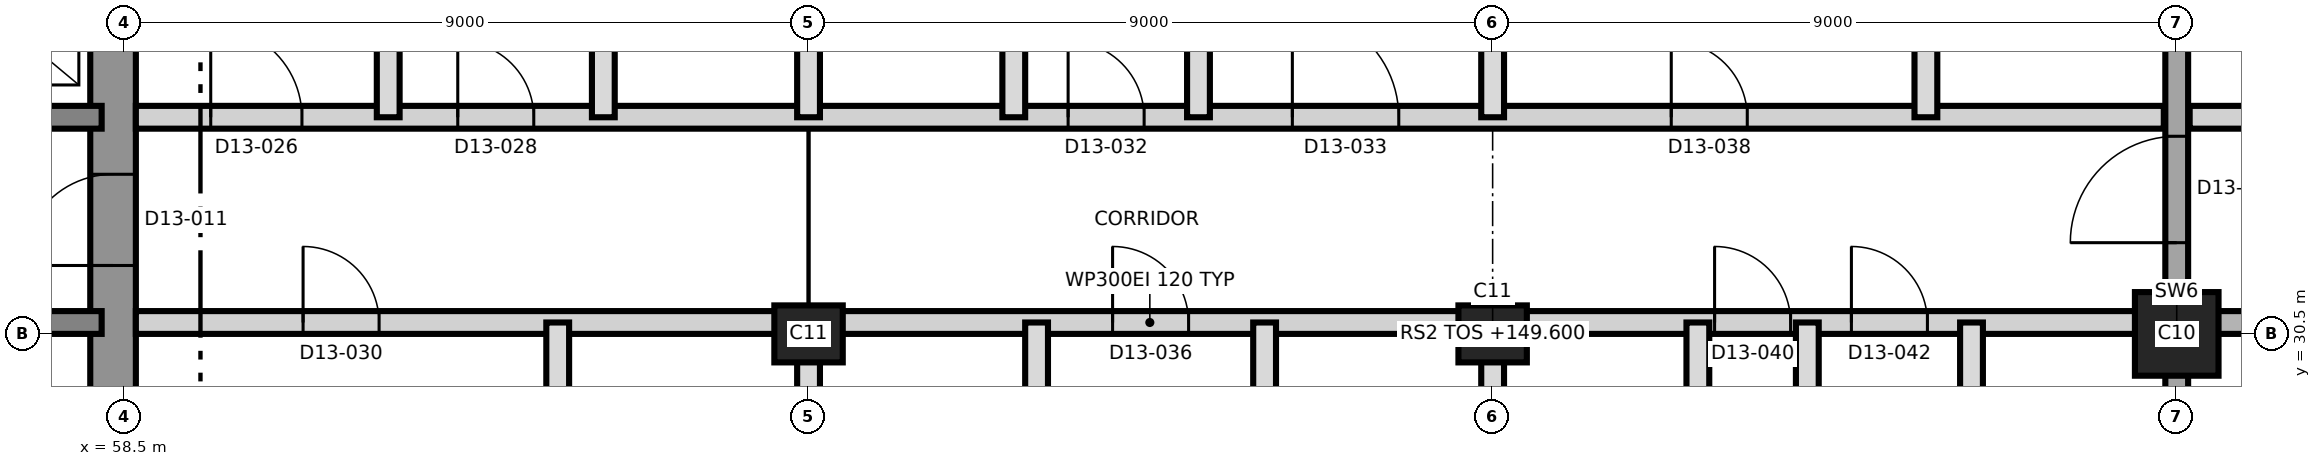
"""IFC4 building model, lengths in metres.
Left out: names, types, materials, properties, quantities, classifications, styles, units other than length and angle.
Written with IfcOpenShell. Run it as: python <this file> out.ifc"""

import sys

from ifc_helpers import new_model, si_unit, direction, frame, frame_2d, origin, origin_2d, place, context, subcontext, project, spatial, rectangle, extrude, element, fill, save


model = new_model("IFC4")
c1 = context("Model", 3, precision=1e-05, world=origin(), true_north=direction((0.0, 1.0)))
c2 = subcontext(c1, "Body", "Model", "MODEL_VIEW")
j1 = project(units=[si_unit("LENGTHUNIT", "METRE"), si_unit("PLANEANGLEUNIT", "RADIAN")], contexts=[c1])
p1 = place(None, origin())
s1 = spatial("IfcSite", under=j1, at=p1, CompositionType="ELEMENT")
p2 = place(p1, origin())
s2 = spatial("IfcBuilding", under=s1, at=p2, CompositionType="ELEMENT")
p3 = place(p2, frame((0.0, 0.0, 145.9)))
s3 = spatial("IfcBuildingStorey", under=s2, at=p3, CompositionType="ELEMENT", Elevation=145.9)
p4 = place(p3, frame((58.35, 21.2, 0.0), z_axis=(0.0, 0.0, 1.0), x_axis=(0.0, 1.0, 0.0)))
e1 = element("IfcWall", 1, at=p4, inside=s3, PredefinedType="SHEAR", context=c2, shape_type="SweptSolid", body=[
    extrude(rectangle(XDim=18.6, YDim=0.6, at=frame_2d((9.3, 0.0))), origin(), (0.0, 0.0, 1.0), 3.7),
])
p5 = place(p4, frame((10.2, 0.0, 0.0)))
e2 = element("IfcOpeningElement", 2, at=p5, cuts=e1, PredefinedType="OPENING", context=c2, shape_type="SweptSolid", body=[
    extrude(rectangle(XDim=1.2, YDim=2.1, at=frame_2d((0.6, 1.05))), frame((0.0, 0.31, 0.0), z_axis=(0.0, -1.0, 0.0), x_axis=(1.0, 0.0, 0.0)), (0.0, 0.0, 1.0), 0.62),
])
p6 = place(p3, frame((31.8, 30.65, 0.0), z_axis=(0.0, 0.0, 1.0), x_axis=(1.0, 0.0, 0.0)))
e3 = element("IfcWall", 3, at=p6, inside=s3, PredefinedType="SHEAR", context=c2, shape_type="SweptSolid", body=[
    extrude(rectangle(XDim=26.4, YDim=0.3, at=frame_2d((13.2, 0.0))), origin(), (0.0, 0.0, 1.0), 3.7),
])
p7 = place(p6, frame((24.7, 0.0, 0.0)))
e4 = element("IfcOpeningElement", 4, at=p7, cuts=e3, PredefinedType="OPENING", context=c2, shape_type="SweptSolid", body=[
    extrude(rectangle(XDim=1.0, YDim=2.1, at=frame_2d((0.5, 1.05))), frame((0.0, 0.16, 0.0), z_axis=(0.0, -1.0, 0.0), x_axis=(1.0, 0.0, 0.0)), (0.0, 0.0, 1.0), 0.32),
])
p8 = place(p6, frame((4.0, 0.0, 0.0)))
e5 = element("IfcOpeningElement", 5, at=p8, cuts=e3, PredefinedType="OPENING", context=c2, shape_type="SweptSolid", body=[
    extrude(rectangle(XDim=1.0, YDim=2.1, at=frame_2d((0.5, 1.05))), frame((0.0, 0.16, 0.0), z_axis=(0.0, -1.0, 0.0), x_axis=(1.0, 0.0, 0.0)), (0.0, 0.0, 1.0), 0.32),
])
p9 = place(p3, frame((31.8, 33.35, 0.0), z_axis=(0.0, 0.0, 1.0), x_axis=(1.0, 0.0, 0.0)))
e6 = element("IfcWall", 6, at=p9, inside=s3, PredefinedType="SHEAR", context=c2, shape_type="SweptSolid", body=[
    extrude(rectangle(XDim=26.4, YDim=0.3, at=frame_2d((13.2, 0.0))), origin(), (0.0, 0.0, 1.0), 3.7),
])
p10 = place(p9, frame((13.85, 0.0, 0.0)))
e7 = element("IfcOpeningElement", 7, at=p10, cuts=e6, PredefinedType="OPENING", context=c2, shape_type="SweptSolid", body=[
    extrude(rectangle(XDim=1.4, YDim=2.1, at=frame_2d((0.7, 1.05))), frame((0.0, 0.16, 0.0), z_axis=(0.0, -1.0, 0.0), x_axis=(1.0, 0.0, 0.0)), (0.0, 0.0, 1.0), 0.32),
])
p11 = place(p9, frame((5.325, 0.0, 0.0)))
e8 = element("IfcOpeningElement", 8, at=p11, cuts=e6, PredefinedType="OPENING", context=c2, shape_type="SweptSolid", body=[
    extrude(rectangle(XDim=1.2, YDim=2.1, at=frame_2d((0.6, 1.05))), frame((0.0, 0.16, 0.0), z_axis=(0.0, -1.0, 0.0), x_axis=(1.0, 0.0, 0.0)), (0.0, 0.0, 1.0), 0.32),
])
p12 = place(p9, frame((19.875, 0.0, 0.0)))
e9 = element("IfcOpeningElement", 9, at=p12, cuts=e6, PredefinedType="OPENING", context=c2, shape_type="SweptSolid", body=[
    extrude(rectangle(XDim=1.2, YDim=2.1, at=frame_2d((0.6, 1.05))), frame((0.0, 0.16, 0.0), z_axis=(0.0, -1.0, 0.0), x_axis=(1.0, 0.0, 0.0)), (0.0, 0.0, 1.0), 0.32),
])
for number, where, z_axis, x_axis in (
    (10, (67.5, 30.5, 0.0), (0.0, 0.0, 1.0), (1.0, 0.0, 0.0)),
    (11, (76.5, 30.5, 0.0), (0.0, 0.0, 1.0), (1.0, 0.0, 0.0)),
):
    element("IfcColumn", number, at=place(p3, frame(where, z_axis=z_axis, x_axis=x_axis)), inside=s3, PredefinedType="COLUMN", context=c2, shape_type="SweptSolid", body=[
        extrude(rectangle(XDim=0.9, YDim=0.75, at=origin_2d()), origin(), (0.0, 0.0, 1.0), 3.7),
    ])
p13 = place(p3, frame((85.5, 30.5, 0.0), z_axis=(0.0, 0.0, 1.0), x_axis=(1.0, 0.0, 0.0)))
e12 = element("IfcColumn", 12, at=p13, inside=s3, PredefinedType="COLUMN", context=c2, shape_type="SweptSolid", body=[
    extrude(rectangle(XDim=1.1, YDim=1.1, at=origin_2d()), origin(), (0.0, 0.0, 1.0), 3.7),
])
p14 = place(p3, frame((85.5, 20.35, 0.0), z_axis=(0.0, 0.0, 1.0), x_axis=(0.0, 1.0, 0.0)))
e13 = element("IfcWall", 13, at=p14, inside=s3, PredefinedType="SHEAR", context=c2, shape_type="SweptSolid", body=[
    extrude(rectangle(XDim=20.3, YDim=0.3, at=frame_2d((10.15, 0.0))), origin(), (0.0, 0.0, 1.0), 3.7),
])
p15 = place(p14, frame((11.35, 0.0, 0.0)))
e14 = element("IfcOpeningElement", 14, at=p15, cuts=e13, PredefinedType="OPENING", context=c2, shape_type="SweptSolid", body=[
    extrude(rectangle(XDim=1.4, YDim=2.1, at=frame_2d((0.7, 1.05))), frame((0.0, 0.16, 0.0), z_axis=(0.0, -1.0, 0.0), x_axis=(1.0, 0.0, 0.0)), (0.0, 0.0, 1.0), 0.32),
])
p16 = place(p3, frame((58.65, 30.65, 0.0), z_axis=(0.0, 0.0, 1.0), x_axis=(1.0, 0.0, 0.0)))
e15 = element("IfcWall", 15, at=p16, inside=s3, PredefinedType="PARTITIONING", context=c2, shape_type="SweptSolid", body=[
    extrude(rectangle(XDim=26.68, YDim=0.3, at=frame_2d((13.34, 0.0))), origin(), (0.0, 0.0, 1.0), 3.3),
])
p17 = place(p16, frame((2.2, 0.0, 0.0)))
e16 = element("IfcOpeningElement", 16, at=p17, cuts=e15, PredefinedType="OPENING", context=c2, shape_type="SweptSolid", body=[
    extrude(rectangle(XDim=1.0, YDim=2.4, at=frame_2d((0.5, 1.2))), frame((0.0, 0.16, 0.0), z_axis=(0.0, -1.0, 0.0), x_axis=(1.0, 0.0, 0.0)), (0.0, 0.0, 1.0), 0.32),
])
p18 = place(p16, frame((12.85, 0.0, 0.0)))
e17 = element("IfcOpeningElement", 17, at=p18, cuts=e15, PredefinedType="OPENING", context=c2, shape_type="SweptSolid", body=[
    extrude(rectangle(XDim=1.0, YDim=2.4, at=frame_2d((0.5, 1.2))), frame((0.0, 0.16, 0.0), z_axis=(0.0, -1.0, 0.0), x_axis=(1.0, 0.0, 0.0)), (0.0, 0.0, 1.0), 0.32),
])
p19 = place(p16, frame((20.77, 0.0, 0.0)))
e18 = element("IfcOpeningElement", 18, at=p19, cuts=e15, PredefinedType="OPENING", context=c2, shape_type="SweptSolid", body=[
    extrude(rectangle(XDim=1.0, YDim=2.1, at=frame_2d((0.5, 1.05))), frame((0.0, 0.16, 0.0), z_axis=(0.0, -1.0, 0.0), x_axis=(1.0, 0.0, 0.0)), (0.0, 0.0, 1.0), 0.32),
])
p20 = place(p16, frame((22.57, 0.0, 0.0)))
e19 = element("IfcOpeningElement", 19, at=p20, cuts=e15, PredefinedType="OPENING", context=c2, shape_type="SweptSolid", body=[
    extrude(rectangle(XDim=1.0, YDim=2.1, at=frame_2d((0.5, 1.05))), frame((0.0, 0.16, 0.0), z_axis=(0.0, -1.0, 0.0), x_axis=(1.0, 0.0, 0.0)), (0.0, 0.0, 1.0), 0.32),
])
p21 = place(p3, frame((85.67, 30.65, 0.0), z_axis=(0.0, 0.0, 1.0), x_axis=(1.0, 0.0, 0.0)))
e20 = element("IfcWall", 20, at=p21, inside=s3, PredefinedType="SHEAR", context=c2, shape_type="SweptSolid", body=[
    extrude(rectangle(XDim=9.58, YDim=0.3, at=frame_2d((4.79, 0.0))), origin(), (0.0, 0.0, 1.0), 3.4),
])
p22 = place(p21, frame((2.08, 0.0, 0.0)))
e21 = element("IfcOpeningElement", 21, at=p22, cuts=e20, PredefinedType="OPENING", context=c2, shape_type="SweptSolid", body=[
    extrude(rectangle(XDim=1.2, YDim=2.1, at=frame_2d((0.6, 1.05))), frame((0.0, 0.16, 0.0), z_axis=(0.0, -1.0, 0.0), x_axis=(1.0, 0.0, 0.0)), (0.0, 0.0, 1.0), 0.32),
])
p23 = place(p21, frame((5.63, 0.0, 0.0)))
e22 = element("IfcOpeningElement", 22, at=p23, cuts=e20, PredefinedType="OPENING", context=c2, shape_type="SweptSolid", body=[
    extrude(rectangle(XDim=1.0, YDim=2.1, at=frame_2d((0.5, 1.05))), frame((0.0, 0.16, 0.0), z_axis=(0.0, -1.0, 0.0), x_axis=(1.0, 0.0, 0.0)), (0.0, 0.0, 1.0), 0.32),
])
p24 = place(p3, frame((58.65, 33.35, 0.0), z_axis=(0.0, 0.0, 1.0), x_axis=(1.0, 0.0, 0.0)))
e23 = element("IfcWall", 23, at=p24, inside=s3, PredefinedType="PARTITIONING", context=c2, shape_type="SweptSolid", body=[
    extrude(rectangle(XDim=26.68, YDim=0.3, at=frame_2d((13.34, 0.0))), origin(), (0.0, 0.0, 1.0), 3.3),
])
p25 = place(p24, frame((0.985, 0.0, 0.0)))
e24 = element("IfcOpeningElement", 24, at=p25, cuts=e23, PredefinedType="OPENING", context=c2, shape_type="SweptSolid", body=[
    extrude(rectangle(XDim=1.2, YDim=2.1, at=frame_2d((0.6, 1.05))), frame((0.0, 0.16, 0.0), z_axis=(0.0, -1.0, 0.0), x_axis=(1.0, 0.0, 0.0)), (0.0, 0.0, 1.0), 0.32),
])
p26 = place(p24, frame((4.235, 0.0, 0.0)))
e25 = element("IfcOpeningElement", 25, at=p26, cuts=e23, PredefinedType="OPENING", context=c2, shape_type="SweptSolid", body=[
    extrude(rectangle(XDim=1.0, YDim=2.1, at=frame_2d((0.5, 1.05))), frame((0.0, 0.16, 0.0), z_axis=(0.0, -1.0, 0.0), x_axis=(1.0, 0.0, 0.0)), (0.0, 0.0, 1.0), 0.32),
])
p27 = place(p24, frame((12.265, 0.0, 0.0)))
e26 = element("IfcOpeningElement", 26, at=p27, cuts=e23, PredefinedType="OPENING", context=c2, shape_type="SweptSolid", body=[
    extrude(rectangle(XDim=1.0, YDim=2.1, at=frame_2d((0.5, 1.05))), frame((0.0, 0.16, 0.0), z_axis=(0.0, -1.0, 0.0), x_axis=(1.0, 0.0, 0.0)), (0.0, 0.0, 1.0), 0.32),
])
p28 = place(p24, frame((15.215, 0.0, 0.0)))
e27 = element("IfcOpeningElement", 27, at=p28, cuts=e23, PredefinedType="OPENING", context=c2, shape_type="SweptSolid", body=[
    extrude(rectangle(XDim=1.4, YDim=2.1, at=frame_2d((0.7, 1.05))), frame((0.0, 0.16, 0.0), z_axis=(0.0, -1.0, 0.0), x_axis=(1.0, 0.0, 0.0)), (0.0, 0.0, 1.0), 0.32),
])
p29 = place(p24, frame((20.2, 0.0, 0.0)))
e28 = element("IfcOpeningElement", 28, at=p29, cuts=e23, PredefinedType="OPENING", context=c2, shape_type="SweptSolid", body=[
    extrude(rectangle(XDim=1.0, YDim=2.4, at=frame_2d((0.5, 1.2))), frame((0.0, 0.16, 0.0), z_axis=(0.0, -1.0, 0.0), x_axis=(1.0, 0.0, 0.0)), (0.0, 0.0, 1.0), 0.32),
])
p30 = place(p3, frame((85.67, 33.35, 0.0), z_axis=(0.0, 0.0, 1.0), x_axis=(1.0, 0.0, 0.0)))
e29 = element("IfcWall", 29, at=p30, inside=s3, PredefinedType="PARTITIONING", context=c2, shape_type="SweptSolid", body=[
    extrude(rectangle(XDim=9.58, YDim=0.3, at=frame_2d((4.79, 0.0))), origin(), (0.0, 0.0, 1.0), 3.3),
])
p31 = place(p30, frame((1.83, 0.0, 0.0)))
e30 = element("IfcOpeningElement", 30, at=p31, cuts=e29, PredefinedType="OPENING", context=c2, shape_type="SweptSolid", body=[
    extrude(rectangle(XDim=1.0, YDim=2.1, at=frame_2d((0.5, 1.05))), frame((0.0, 0.16, 0.0), z_axis=(0.0, -1.0, 0.0), x_axis=(1.0, 0.0, 0.0)), (0.0, 0.0, 1.0), 0.32),
])
p32 = place(p30, frame((5.63, 0.0, 0.0)))
e31 = element("IfcOpeningElement", 31, at=p32, cuts=e29, PredefinedType="OPENING", context=c2, shape_type="SweptSolid", body=[
    extrude(rectangle(XDim=1.0, YDim=2.1, at=frame_2d((0.5, 1.05))), frame((0.0, 0.16, 0.0), z_axis=(0.0, -1.0, 0.0), x_axis=(1.0, 0.0, 0.0)), (0.0, 0.0, 1.0), 0.32),
])
p33 = place(p3, frame((61.97, 33.35, 0.0), z_axis=(0.0, 0.0, 1.0), x_axis=(0.0, 1.0, 0.0)))
e32 = element("IfcWall", 32, at=p33, inside=s3, PredefinedType="PARTITIONING", context=c2, shape_type="SweptSolid", body=[
    extrude(rectangle(XDim=7.44, YDim=0.3, at=frame_2d((3.72, 0.0))), origin(), (0.0, 0.0, 1.0), 3.4),
])
p34 = place(p3, frame((64.2, 27.15, 0.0), z_axis=(0.0, 0.0, 1.0), x_axis=(0.0, 1.0, 0.0)))
e33 = element("IfcWall", 33, at=p34, inside=s3, PredefinedType="PARTITIONING", context=c2, shape_type="SweptSolid", body=[
    extrude(rectangle(XDim=3.5, YDim=0.3, at=frame_2d((1.75, 0.0))), origin(), (0.0, 0.0, 1.0), 3.4),
])
p35 = place(p3, frame((64.8, 33.35, 0.0), z_axis=(0.0, 0.0, 1.0), x_axis=(0.0, 1.0, 0.0)))
e34 = element("IfcWall", 34, at=p35, inside=s3, PredefinedType="PARTITIONING", context=c2, shape_type="SweptSolid", body=[
    extrude(rectangle(XDim=3.2, YDim=0.3, at=frame_2d((1.6, 0.0))), origin(), (0.0, 0.0, 1.0), 3.4),
])
p36 = place(p3, frame((67.5, 20.35, 0.0), z_axis=(0.0, 0.0, 1.0), x_axis=(0.0, 1.0, 0.0)))
e35 = element("IfcWall", 35, at=p36, inside=s3, PredefinedType="PARTITIONING", context=c2, shape_type="SweptSolid", body=[
    extrude(rectangle(XDim=10.3, YDim=0.3, at=frame_2d((5.15, 0.0))), origin(), (0.0, 0.0, 1.0), 3.3),
])
p37 = place(p3, frame((67.5, 33.35, 0.0), z_axis=(0.0, 0.0, 1.0), x_axis=(0.0, 1.0, 0.0)))
e36 = element("IfcWall", 36, at=p37, inside=s3, PredefinedType="PARTITIONING", context=c2, shape_type="SweptSolid", body=[
    extrude(rectangle(XDim=7.48, YDim=0.3, at=frame_2d((3.74, 0.0))), origin(), (0.0, 0.0, 1.0), 3.3),
])
p38 = place(p3, frame((70.2, 33.35, 0.0), z_axis=(0.0, 0.0, 1.0), x_axis=(0.0, 1.0, 0.0)))
e37 = element("IfcWall", 37, at=p38, inside=s3, PredefinedType="PARTITIONING", context=c2, shape_type="SweptSolid", body=[
    extrude(rectangle(XDim=3.2, YDim=0.3, at=frame_2d((1.6, 0.0))), origin(), (0.0, 0.0, 1.0), 3.3),
])
p39 = place(p3, frame((70.5, 27.35, 0.0), z_axis=(0.0, 0.0, 1.0), x_axis=(0.0, 1.0, 0.0)))
e38 = element("IfcWall", 38, at=p39, inside=s3, PredefinedType="PARTITIONING", context=c2, shape_type="SweptSolid", body=[
    extrude(rectangle(XDim=3.3, YDim=0.3, at=frame_2d((1.65, 0.0))), origin(), (0.0, 0.0, 1.0), 3.3),
])
p40 = place(p3, frame((72.63, 33.35, 0.0), z_axis=(0.0, 0.0, 1.0), x_axis=(0.0, 1.0, 0.0)))
e39 = element("IfcWall", 39, at=p40, inside=s3, PredefinedType="PARTITIONING", context=c2, shape_type="SweptSolid", body=[
    extrude(rectangle(XDim=7.48, YDim=0.3, at=frame_2d((3.74, 0.0))), origin(), (0.0, 0.0, 1.0), 3.3),
])
p41 = place(p3, frame((73.5, 27.35, 0.0), z_axis=(0.0, 0.0, 1.0), x_axis=(0.0, 1.0, 0.0)))
e40 = element("IfcWall", 40, at=p41, inside=s3, PredefinedType="PARTITIONING", context=c2, shape_type="SweptSolid", body=[
    extrude(rectangle(XDim=3.3, YDim=0.3, at=frame_2d((1.65, 0.0))), origin(), (0.0, 0.0, 1.0), 3.3),
])
p42 = place(p3, frame((76.5, 20.35, 0.0), z_axis=(0.0, 0.0, 1.0), x_axis=(0.0, 1.0, 0.0)))
e41 = element("IfcWall", 41, at=p42, inside=s3, PredefinedType="PARTITIONING", context=c2, shape_type="SweptSolid", body=[
    extrude(rectangle(XDim=10.3, YDim=0.3, at=frame_2d((5.15, 0.0))), origin(), (0.0, 0.0, 1.0), 3.3),
])
p43 = place(p3, frame((76.5, 33.35, 0.0), z_axis=(0.0, 0.0, 1.0), x_axis=(0.0, 1.0, 0.0)))
e42 = element("IfcWall", 42, at=p43, inside=s3, PredefinedType="PARTITIONING", context=c2, shape_type="SweptSolid", body=[
    extrude(rectangle(XDim=7.48, YDim=0.3, at=frame_2d((3.74, 0.0))), origin(), (0.0, 0.0, 1.0), 3.3),
])
p44 = place(p3, frame((79.2, 27.45, 0.0), z_axis=(0.0, 0.0, 1.0), x_axis=(0.0, 1.0, 0.0)))
e43 = element("IfcWall", 43, at=p44, inside=s3, PredefinedType="PARTITIONING", context=c2, shape_type="SweptSolid", body=[
    extrude(rectangle(XDim=3.2, YDim=0.3, at=frame_2d((1.6, 0.0))), origin(), (0.0, 0.0, 1.0), 3.3),
])
p45 = place(p3, frame((80.64, 20.35, 0.0), z_axis=(0.0, 0.0, 1.0), x_axis=(0.0, 1.0, 0.0)))
e44 = element("IfcWall", 44, at=p45, inside=s3, PredefinedType="PARTITIONING", context=c2, shape_type="SweptSolid", body=[
    extrude(rectangle(XDim=10.3, YDim=0.3, at=frame_2d((5.15, 0.0))), origin(), (0.0, 0.0, 1.0), 3.3),
])
p46 = place(p3, frame((82.2, 33.35, 0.0), z_axis=(0.0, 0.0, 1.0), x_axis=(0.0, 1.0, 0.0)))
e45 = element("IfcWall", 45, at=p46, inside=s3, PredefinedType="PARTITIONING", context=c2, shape_type="SweptSolid", body=[
    extrude(rectangle(XDim=3.5, YDim=0.3, at=frame_2d((1.75, 0.0))), origin(), (0.0, 0.0, 1.0), 3.3),
])
p47 = place(p3, frame((82.8, 27.45, 0.0), z_axis=(0.0, 0.0, 1.0), x_axis=(0.0, 1.0, 0.0)))
e46 = element("IfcWall", 46, at=p47, inside=s3, PredefinedType="PARTITIONING", context=c2, shape_type="SweptSolid", body=[
    extrude(rectangle(XDim=3.2, YDim=0.3, at=frame_2d((1.6, 0.0))), origin(), (0.0, 0.0, 1.0), 3.3),
])
p48 = place(p5, origin())
e47 = element("IfcDoor", 47, at=p48, inside=s3, OperationType="SINGLE_SWING_LEFT", PredefinedType="DOOR", context=c2, shape_type="SweptSolid", body=[
    extrude(rectangle(XDim=1.2, YDim=2.1, at=frame_2d((0.6, 1.05))), frame((0.0, 0.025, 0.0), z_axis=(0.0, -1.0, 0.0), x_axis=(1.0, 0.0, 0.0)), (0.0, 0.0, 1.0), 0.05),
])
fill(e2, e47)
p49 = place(p25, origin())
e48 = element("IfcDoor", 48, at=p49, inside=s3, OperationType="SINGLE_SWING_LEFT", PredefinedType="DOOR", context=c2, shape_type="SweptSolid", body=[
    extrude(rectangle(XDim=1.2, YDim=2.1, at=frame_2d((0.6, 1.05))), frame((0.0, 0.025, 0.0), z_axis=(0.0, -1.0, 0.0), x_axis=(1.0, 0.0, 0.0)), (0.0, 0.0, 1.0), 0.05),
])
fill(e24, e48)
p50 = place(p26, origin())
e49 = element("IfcDoor", 49, at=p50, inside=s3, OperationType="SINGLE_SWING_LEFT", PredefinedType="DOOR", context=c2, shape_type="SweptSolid", body=[
    extrude(rectangle(XDim=1.0, YDim=2.1, at=frame_2d((0.5, 1.05))), frame((0.0, 0.025, 0.0), z_axis=(0.0, -1.0, 0.0), x_axis=(1.0, 0.0, 0.0)), (0.0, 0.0, 1.0), 0.05),
])
fill(e25, e49)
p51 = place(p17, origin())
e50 = element("IfcDoor", 50, at=p51, inside=s3, OperationType="SINGLE_SWING_LEFT", PredefinedType="DOOR", context=c2, shape_type="SweptSolid", body=[
    extrude(rectangle(XDim=1.0, YDim=2.4, at=frame_2d((0.5, 1.2))), frame((0.0, 0.025, 0.0), z_axis=(0.0, -1.0, 0.0), x_axis=(1.0, 0.0, 0.0)), (0.0, 0.0, 1.0), 0.05),
])
fill(e16, e50)
p52 = place(p27, origin())
e51 = element("IfcDoor", 51, at=p52, inside=s3, OperationType="SINGLE_SWING_RIGHT", PredefinedType="DOOR", context=c2, shape_type="SweptSolid", body=[
    extrude(rectangle(XDim=1.0, YDim=2.1, at=frame_2d((0.5, 1.05))), frame((0.0, 0.025, 0.0), z_axis=(0.0, -1.0, 0.0), x_axis=(1.0, 0.0, 0.0)), (0.0, 0.0, 1.0), 0.05),
])
fill(e26, e51)
p53 = place(p28, origin())
e52 = element("IfcDoor", 52, at=p53, inside=s3, OperationType="SINGLE_SWING_LEFT", PredefinedType="DOOR", context=c2, shape_type="SweptSolid", body=[
    extrude(rectangle(XDim=1.4, YDim=2.1, at=frame_2d((0.7, 1.05))), frame((0.0, 0.025, 0.0), z_axis=(0.0, -1.0, 0.0), x_axis=(1.0, 0.0, 0.0)), (0.0, 0.0, 1.0), 0.05),
])
fill(e27, e52)
p54 = place(p18, origin())
e53 = element("IfcDoor", 53, at=p54, inside=s3, OperationType="SINGLE_SWING_RIGHT", PredefinedType="DOOR", context=c2, shape_type="SweptSolid", body=[
    extrude(rectangle(XDim=1.0, YDim=2.4, at=frame_2d((0.5, 1.2))), frame((0.0, 0.025, 0.0), z_axis=(0.0, -1.0, 0.0), x_axis=(1.0, 0.0, 0.0)), (0.0, 0.0, 1.0), 0.05),
])
fill(e17, e53)
p55 = place(p29, origin())
e54 = element("IfcDoor", 54, at=p55, inside=s3, OperationType="SINGLE_SWING_RIGHT", PredefinedType="DOOR", context=c2, shape_type="SweptSolid", body=[
    extrude(rectangle(XDim=1.0, YDim=2.4, at=frame_2d((0.5, 1.2))), frame((0.0, 0.025, 0.0), z_axis=(0.0, -1.0, 0.0), x_axis=(1.0, 0.0, 0.0)), (0.0, 0.0, 1.0), 0.05),
])
fill(e28, e54)
p56 = place(p19, origin())
e55 = element("IfcDoor", 55, at=p56, inside=s3, OperationType="SINGLE_SWING_LEFT", PredefinedType="DOOR", context=c2, shape_type="SweptSolid", body=[
    extrude(rectangle(XDim=1.0, YDim=2.1, at=frame_2d((0.5, 1.05))), frame((0.0, 0.025, 0.0), z_axis=(0.0, -1.0, 0.0), x_axis=(1.0, 0.0, 0.0)), (0.0, 0.0, 1.0), 0.05),
])
fill(e18, e55)
p57 = place(p20, origin())
e56 = element("IfcDoor", 56, at=p57, inside=s3, OperationType="SINGLE_SWING_LEFT", PredefinedType="DOOR", context=c2, shape_type="SweptSolid", body=[
    extrude(rectangle(XDim=1.0, YDim=2.1, at=frame_2d((0.5, 1.05))), frame((0.0, 0.025, 0.0), z_axis=(0.0, -1.0, 0.0), x_axis=(1.0, 0.0, 0.0)), (0.0, 0.0, 1.0), 0.05),
])
fill(e19, e56)
p58 = place(p15, origin())
e57 = element("IfcDoor", 57, at=p58, inside=s3, OperationType="SINGLE_SWING_RIGHT", PredefinedType="DOOR", context=c2, shape_type="SweptSolid", body=[
    extrude(rectangle(XDim=1.4, YDim=2.1, at=frame_2d((0.7, 1.05))), frame((0.0, 0.025, 0.0), z_axis=(0.0, -1.0, 0.0), x_axis=(1.0, 0.0, 0.0)), (0.0, 0.0, 1.0), 0.05),
])
fill(e14, e57)
save(model, sys.argv[1])
